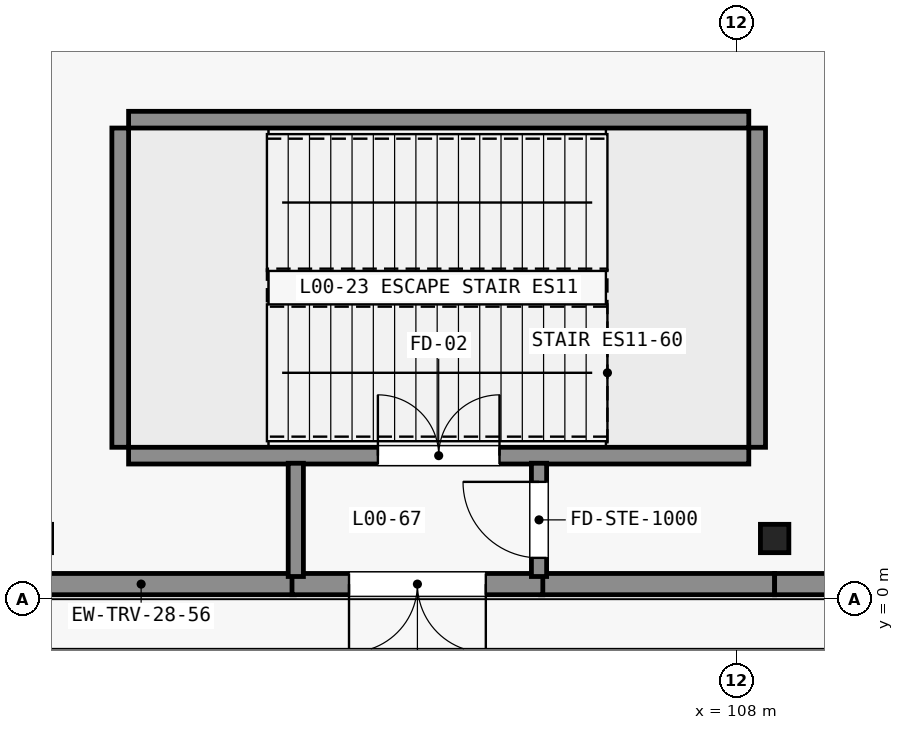
"""IFC4 building model, lengths in metres.
Left out: names, types, materials, properties, quantities, classifications, styles, units other than length and angle.
Written with IfcOpenShell. Run it as: python <this file> out.ifc"""

import sys

from ifc_helpers import new_model, si_unit, direction, frame, frame_2d, origin, origin_2d, place, context, subcontext, project, spatial, rectangle, i_section, extrude, element, fill, save


model = new_model("IFC4")
c1 = context("Model", 3, precision=1e-05, world=origin(), true_north=direction((0.0, 1.0)))
c2 = subcontext(c1, "Body", "Model", "MODEL_VIEW")
j1 = project(units=[si_unit("LENGTHUNIT", "METRE"), si_unit("PLANEANGLEUNIT", "RADIAN")], contexts=[c1])
p1 = place(None, origin())
s1 = spatial("IfcSite", under=j1, at=p1, CompositionType="ELEMENT")
p2 = place(p1, origin())
s2 = spatial("IfcBuilding", under=s1, at=p2, CompositionType="ELEMENT")
p3 = place(p2, origin())
s3 = spatial("IfcBuildingStorey", under=s2, at=p3, CompositionType="ELEMENT", Elevation=0.0)
p4 = place(p3, frame((108.5, 0.8, -0.45), z_axis=(0.0, 0.0, 1.0), x_axis=(1.0, 0.0, 0.0)))
e1 = element("IfcColumn", 1, at=p4, inside=s3, PredefinedType="COLUMN", context=c2, shape_type="SweptSolid", body=[
    extrude(i_section(OverallWidth=0.374, OverallDepth=0.373, WebThickness=0.016, FlangeThickness=0.026, FilletRadius=0.018, at=origin_2d()), origin(), (0.0, 0.0, 1.0), 6.45),
])
p5 = place(p3, frame((98.15, 0.2, 0.0), z_axis=(0.0, 0.0, 1.0), x_axis=(1.0, 0.0, 0.0)))
e2 = element("IfcWall", 2, at=p5, inside=s3, PredefinedType="STANDARD", context=c2, shape_type="SweptSolid", body=[
    extrude(rectangle(XDim=4.03, YDim=0.28, at=frame_2d((2.015, 0.0))), origin(), (0.0, 0.0, 1.0), 5.64),
])
p6 = place(p3, frame((105.42, 0.2, 0.0), z_axis=(0.0, 0.0, 1.0), x_axis=(1.0, 0.0, 0.0)))
e3 = element("IfcWall", 3, at=p6, inside=s3, PredefinedType="STANDARD", context=c2, shape_type="SweptSolid", body=[
    extrude(rectangle(XDim=3.08, YDim=0.28, at=frame_2d((1.54, 0.0))), origin(), (0.0, 0.0, 1.0), 5.64),
])
p7 = place(p3, frame((108.5, 0.2, 0.0), z_axis=(0.0, 0.0, 1.0), x_axis=(1.0, 0.0, 0.0)))
e4 = element("IfcWall", 4, at=p7, inside=s3, PredefinedType="STANDARD", context=c2, shape_type="SweptSolid", body=[
    extrude(rectangle(XDim=9.5, YDim=0.28, at=frame_2d((4.75, 0.0))), origin(), (0.0, 0.0, 1.0), 5.64),
])
p8 = place(p7, frame((1.0, 0.0, 0.0)))
e5 = element("IfcOpeningElement", 5, at=p8, cuts=e4, PredefinedType="OPENING", context=c2, shape_type="SweptSolid", body=[
    extrude(rectangle(XDim=2.4, YDim=2.5, at=frame_2d((1.2, 1.25))), frame((0.0, 0.15, 0.0), z_axis=(0.0, -1.0, 0.0), x_axis=(1.0, 0.0, 0.0)), (0.0, 0.0, 1.0), 0.3),
])
p9 = place(p7, frame((4.8, 0.0, 0.0)))
e6 = element("IfcOpeningElement", 6, at=p9, cuts=e4, PredefinedType="OPENING", context=c2, shape_type="SweptSolid", body=[
    extrude(rectangle(XDim=2.4, YDim=2.5, at=frame_2d((1.2, 1.25))), frame((0.0, 0.15, 0.0), z_axis=(0.0, -1.0, 0.0), x_axis=(1.0, 0.0, 0.0)), (0.0, 0.0, 1.0), 0.3),
])
p10 = place(p3, frame((100.0, 1.89, -0.45), z_axis=(0.0, 0.0, 1.0), x_axis=(1.0, 0.0, 0.0)))
e7 = element("IfcWall", 7, at=p10, inside=s3, PredefinedType="SHEAR", context=c2, shape_type="SweptSolid", body=[
    extrude(rectangle(XDim=8.16, YDim=0.22, at=frame_2d((4.08, 0.0))), origin(), (0.0, 0.0, 1.0), 6.45),
])
p11 = place(p10, frame((3.28, 0.0, 0.45)))
e8 = element("IfcOpeningElement", 8, at=p11, cuts=e7, PredefinedType="OPENING", context=c2, shape_type="SweptSolid", body=[
    extrude(rectangle(XDim=1.6, YDim=2.2, at=frame_2d((0.8, 1.1))), frame((0.0, 0.12, 0.0), z_axis=(0.0, -1.0, 0.0), x_axis=(1.0, 0.0, 0.0)), (0.0, 0.0, 1.0), 0.24),
])
p12 = place(p3, frame((100.0, 6.31, -0.45), z_axis=(0.0, 0.0, 1.0), x_axis=(1.0, 0.0, 0.0)))
e9 = element("IfcWall", 9, at=p12, inside=s3, PredefinedType="SHEAR", context=c2, shape_type="SweptSolid", body=[
    extrude(rectangle(XDim=8.16, YDim=0.22, at=frame_2d((4.08, 0.0))), origin(), (0.0, 0.0, 1.0), 6.45),
])
for number, where, z_axis, x_axis in (
    (10, (99.89, 2.0, -0.45), (0.0, 0.0, 1.0), (0.0, 1.0, 0.0)),
    (11, (108.27, 2.0, -0.45), (0.0, 0.0, 1.0), (0.0, 1.0, 0.0)),
):
    element("IfcWall", number, at=place(p3, frame(where, z_axis=z_axis, x_axis=x_axis)), inside=s3, PredefinedType="SHEAR", context=c2, shape_type="SweptSolid", body=[
        extrude(rectangle(XDim=4.2, YDim=0.22, at=frame_2d((2.1, 0.0))), origin(), (0.0, 0.0, 1.0), 6.45),
    ])
p13 = place(p3, frame((105.45, 0.2, 0.0), z_axis=(0.0, 0.0, 1.0), x_axis=(-1.0, 0.0, 0.0)))
e12 = element("IfcWall", 12, at=p13, inside=s3, PredefinedType="STANDARD", context=c2, shape_type="SweptSolid", body=[
    extrude(rectangle(XDim=3.3, YDim=0.28, at=frame_2d((1.65, 0.0))), origin(), (0.0, 0.0, 1.0), 5.64),
])
p14 = place(p13, frame((0.75, 0.0, 0.0)))
e13 = element("IfcOpeningElement", 13, at=p14, cuts=e12, PredefinedType="OPENING", context=c2, shape_type="SweptSolid", body=[
    extrude(rectangle(XDim=1.8, YDim=2.25, at=frame_2d((0.9, 1.125))), frame((0.0, 0.15, 0.0), z_axis=(0.0, -1.0, 0.0), x_axis=(1.0, 0.0, 0.0)), (0.0, 0.0, 1.0), 0.3),
])
p15 = place(p3, frame((102.2, 0.3, 0.0), z_axis=(0.0, 0.0, 1.0), x_axis=(0.0, 1.0, 0.0)))
e14 = element("IfcWall", 14, at=p15, inside=s3, PredefinedType="STANDARD", context=c2, shape_type="SweptSolid", body=[
    extrude(rectangle(XDim=1.49, YDim=0.2, at=frame_2d((0.745, 0.0))), origin(), (0.0, 0.0, 1.0), 5.028),
])
p16 = place(p3, frame((105.4, 0.3, 0.0), z_axis=(0.0, 0.0, 1.0), x_axis=(0.0, 1.0, 0.0)))
e15 = element("IfcWall", 15, at=p16, inside=s3, PredefinedType="STANDARD", context=c2, shape_type="SweptSolid", body=[
    extrude(rectangle(XDim=1.49, YDim=0.2, at=frame_2d((0.745, 0.0))), origin(), (0.0, 0.0, 1.0), 5.028),
])
p17 = place(p16, frame((0.245, 0.0, 0.0)))
e16 = element("IfcOpeningElement", 16, at=p17, cuts=e15, PredefinedType="OPENING", context=c2, shape_type="SweptSolid", body=[
    extrude(rectangle(XDim=1.0, YDim=2.15, at=frame_2d((0.5, 1.075))), frame((0.0, 0.11, 0.0), z_axis=(0.0, -1.0, 0.0), x_axis=(1.0, 0.0, 0.0)), (0.0, 0.0, 1.0), 0.22),
])
p18 = place(p11, origin())
e17 = element("IfcDoor", 17, at=p18, inside=s3, OperationType="DOUBLE_DOOR_SINGLE_SWING", PredefinedType="DOOR", context=c2, shape_type="SweptSolid", body=[
    extrude(rectangle(XDim=1.6, YDim=2.2, at=frame_2d((0.8, 1.1))), frame((0.0, 0.025, 0.0), z_axis=(0.0, -1.0, 0.0), x_axis=(1.0, 0.0, 0.0)), (0.0, 0.0, 1.0), 0.05),
])
fill(e8, e17)
p19 = place(p14, origin())
e18 = element("IfcDoor", 18, at=p19, inside=s3, OperationType="DOUBLE_DOOR_SINGLE_SWING", PredefinedType="DOOR", context=c2, shape_type="SweptSolid", body=[
    extrude(rectangle(XDim=1.8, YDim=2.25, at=frame_2d((0.9, 1.125))), frame((0.0, 0.025, 0.0), z_axis=(0.0, -1.0, 0.0), x_axis=(1.0, 0.0, 0.0)), (0.0, 0.0, 1.0), 0.05),
])
fill(e13, e18)
p20 = place(p17, origin())
e19 = element("IfcDoor", 19, at=p20, inside=s3, OperationType="SINGLE_SWING_RIGHT", PredefinedType="DOOR", context=c2, shape_type="SweptSolid", body=[
    extrude(rectangle(XDim=1.0, YDim=2.15, at=frame_2d((0.5, 1.075))), frame((0.0, 0.025, 0.0), z_axis=(0.0, -1.0, 0.0), x_axis=(1.0, 0.0, 0.0)), (0.0, 0.0, 1.0), 0.05),
])
fill(e16, e19)
save(model, sys.argv[1])
